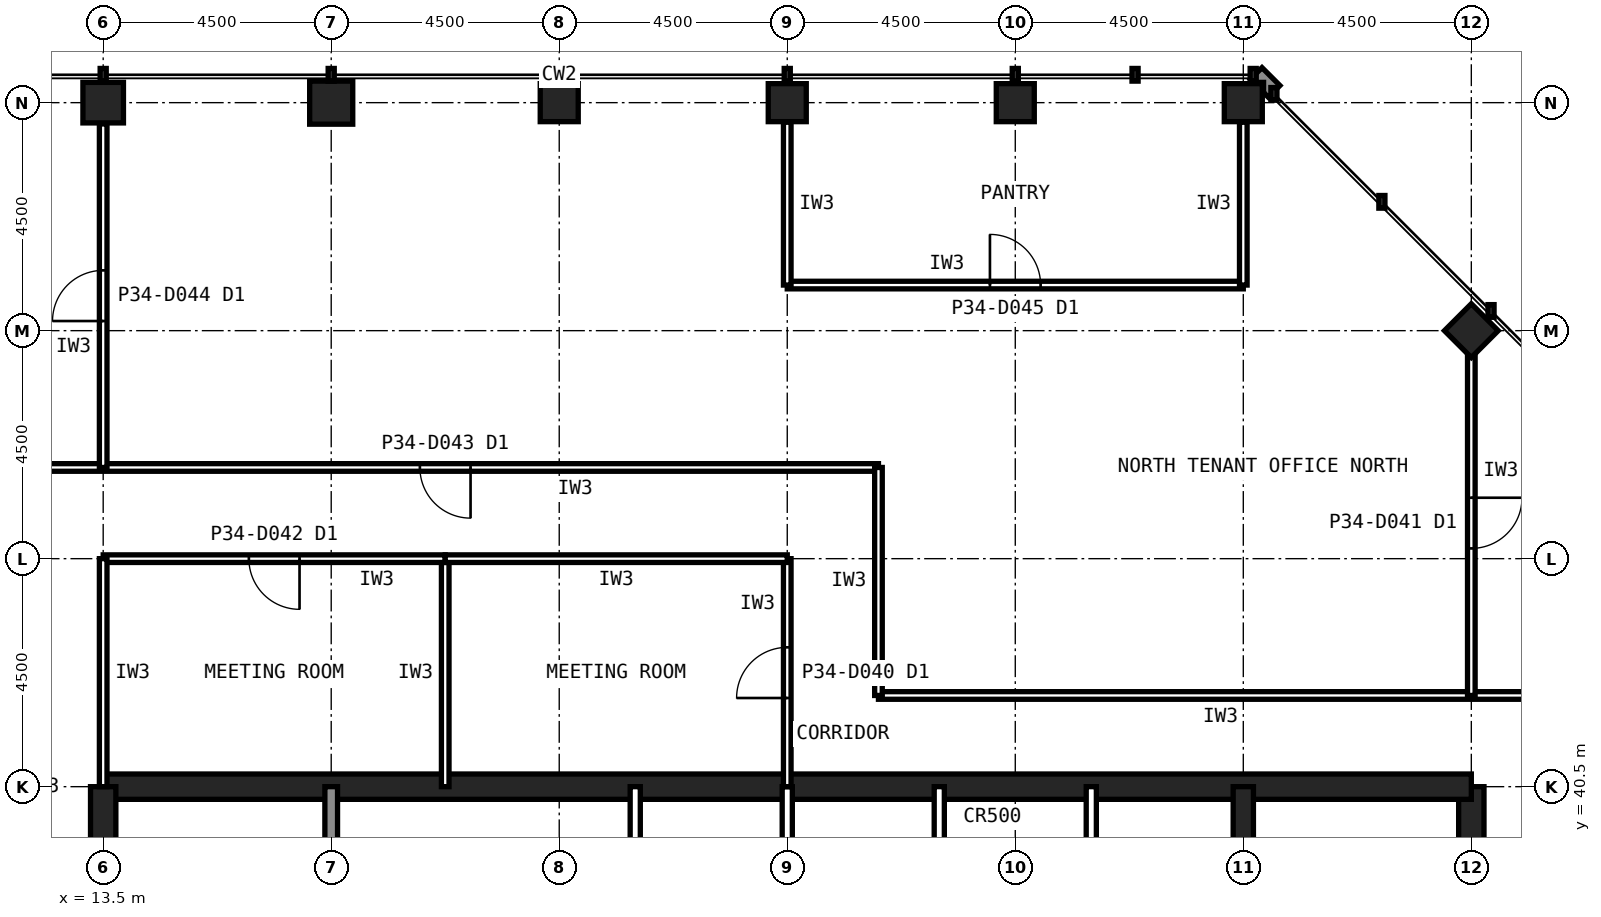
"""IFC4 building model, lengths in metres.
Left out: names, types, materials, properties, quantities, classifications, styles, units other than length and angle.
Written with IfcOpenShell. Run it as: python <this file> out.ifc"""

import sys

from ifc_helpers import new_model, si_unit, direction, frame, frame_2d, origin, origin_2d, place, context, subcontext, project, spatial, rectangle, hollow_rectangle, extrude, element, fill, save


model = new_model("IFC4")
c1 = context("Model", 3, precision=1e-05, world=origin(), true_north=direction((0.0, 1.0)))
c2 = subcontext(c1, "Body", "Model", "MODEL_VIEW")
j1 = project(units=[si_unit("LENGTHUNIT", "METRE"), si_unit("PLANEANGLEUNIT", "RADIAN")], contexts=[c1])
p1 = place(None, origin())
s1 = spatial("IfcSite", under=j1, at=p1, CompositionType="ELEMENT")
p2 = place(p1, origin())
s2 = spatial("IfcBuilding", under=s1, at=p2, CompositionType="ELEMENT")
p3 = place(p2, frame((0.0, 0.0, 143.6)))
s3 = spatial("IfcBuildingStorey", under=s2, at=p3, CompositionType="ELEMENT", Elevation=143.6)
for number, where, z_axis, x_axis in (
    (1, (36.0, 54.0, 0.0), (0.0, 0.0, 1.0), (1.0, 0.0, 0.0)),
    (2, (31.5, 54.0, 0.0), (0.0, 0.0, 1.0), (1.0, 0.0, 0.0)),
    (3, (27.0, 54.0, 0.0), (0.0, 0.0, 1.0), (1.0, 0.0, 0.0)),
    (4, (22.5, 54.0, 0.0), (0.0, 0.0, 1.0), (1.0, 0.0, 0.0)),
):
    element("IfcColumn", number, at=place(p3, frame(where, z_axis=z_axis, x_axis=x_axis)), inside=s3, PredefinedType="COLUMN", context=c2, shape_type="SweptSolid", body=[
        extrude(hollow_rectangle(XDim=0.75, YDim=0.75, WallThickness=0.04, at=origin_2d()), origin(), (0.0, 0.0, 1.0), 4.0),
    ])
p4 = place(p3, frame((18.0, 54.0, 0.0), z_axis=(0.0, 0.0, 1.0), x_axis=(1.0, 0.0, 0.0)))
e5 = element("IfcColumn", 5, at=p4, inside=s3, PredefinedType="COLUMN", context=c2, shape_type="SweptSolid", body=[
    extrude(hollow_rectangle(XDim=0.85, YDim=0.85, WallThickness=0.05, at=origin_2d()), origin(), (0.0, 0.0, 1.0), 4.0),
])
p5 = place(p3, frame((13.5, 54.0, 0.0), z_axis=(0.0, 0.0, 1.0), x_axis=(1.0, 0.0, 0.0)))
e6 = element("IfcColumn", 6, at=p5, inside=s3, PredefinedType="COLUMN", context=c2, shape_type="SweptSolid", body=[
    extrude(hollow_rectangle(XDim=0.8, YDim=0.8, WallThickness=0.045, at=origin_2d()), origin(), (0.0, 0.0, 1.0), 4.0),
])
p6 = place(p3, frame((40.5, 49.5, 0.0), z_axis=(0.0, 0.0, 1.0), x_axis=(0.707106781187, 0.707106781187, 0.0)))
e7 = element("IfcColumn", 7, at=p6, inside=s3, PredefinedType="COLUMN", context=c2, shape_type="SweptSolid", body=[
    extrude(hollow_rectangle(XDim=0.75, YDim=0.75, WallThickness=0.04, at=origin_2d()), origin(), (0.0, 0.0, 1.0), 4.0),
])
p7 = place(p3, frame((40.5, 13.5, 0.0), z_axis=(0.0, 0.0, 1.0), x_axis=(0.0, 1.0, 0.0)))
e8 = element("IfcWall", 8, at=p7, inside=s3, PredefinedType="SHEAR", context=c2, shape_type="SweptSolid", body=[
    extrude(rectangle(XDim=27.0, YDim=0.5, at=frame_2d((13.5, 0.0))), origin(), (0.0, 0.0, 1.0), 4.0),
])
p8 = place(p7, frame((5.85, 0.0, 0.0)))
e9 = element("IfcOpeningElement", 9, at=p8, cuts=e8, PredefinedType="OPENING", context=c2, shape_type="SweptSolid", body=[
    extrude(rectangle(XDim=1.8, YDim=2.1, at=frame_2d((0.9, 1.05))), frame((0.0, 0.26, 0.0), z_axis=(0.0, -1.0, 0.0), x_axis=(1.0, 0.0, 0.0)), (0.0, 0.0, 1.0), 0.52),
])
p9 = place(p7, frame((19.65, 0.0, 0.0)))
e10 = element("IfcOpeningElement", 10, at=p9, cuts=e8, PredefinedType="OPENING", context=c2, shape_type="SweptSolid", body=[
    extrude(rectangle(XDim=1.2, YDim=2.1, at=frame_2d((0.6, 1.05))), frame((0.0, 0.26, 0.0), z_axis=(0.0, -1.0, 0.0), x_axis=(1.0, 0.0, 0.0)), (0.0, 0.0, 1.0), 0.52),
])
p10 = place(p3, frame((40.5, 40.5, 0.0), z_axis=(0.0, 0.0, 1.0), x_axis=(-1.0, 0.0, 0.0)))
e11 = element("IfcWall", 11, at=p10, inside=s3, PredefinedType="SHEAR", context=c2, shape_type="SweptSolid", body=[
    extrude(rectangle(XDim=27.0, YDim=0.5, at=frame_2d((13.5, 0.0))), origin(), (0.0, 0.0, 1.0), 4.0),
])
p11 = place(p3, frame((13.5, 40.5, 0.0), z_axis=(0.0, 0.0, 1.0), x_axis=(0.0, -1.0, 0.0)))
e12 = element("IfcWall", 12, at=p11, inside=s3, PredefinedType="SHEAR", context=c2, shape_type="SweptSolid", body=[
    extrude(rectangle(XDim=27.0, YDim=0.5, at=frame_2d((13.5, 0.0))), origin(), (0.0, 0.0, 1.0), 4.0),
])
p12 = place(p11, frame((19.65, 0.0, 0.0)))
e13 = element("IfcOpeningElement", 13, at=p12, cuts=e12, PredefinedType="OPENING", context=c2, shape_type="SweptSolid", body=[
    extrude(rectangle(XDim=1.2, YDim=2.1, at=frame_2d((0.6, 1.05))), frame((0.0, 0.26, 0.0), z_axis=(0.0, -1.0, 0.0), x_axis=(1.0, 0.0, 0.0)), (0.0, 0.0, 1.0), 0.52),
])
p13 = place(p11, frame((5.85, 0.0, 0.0)))
e14 = element("IfcOpeningElement", 14, at=p13, cuts=e12, PredefinedType="OPENING", context=c2, shape_type="SweptSolid", body=[
    extrude(rectangle(XDim=1.8, YDim=2.1, at=frame_2d((0.9, 1.05))), frame((0.0, 0.26, 0.0), z_axis=(0.0, -1.0, 0.0), x_axis=(1.0, 0.0, 0.0)), (0.0, 0.0, 1.0), 0.52),
])
p14 = place(p3, frame((18.0, 36.0, 0.0), z_axis=(0.0, 0.0, 1.0), x_axis=(0.0, 1.0, 0.0)))
e15 = element("IfcWall", 15, at=p14, inside=s3, PredefinedType="SOLIDWALL", context=c2, shape_type="SweptSolid", body=[
    extrude(rectangle(XDim=4.5, YDim=0.25, at=frame_2d((2.25, 0.0))), origin(), (0.0, 0.0, 1.0), 3.84),
])
p15 = place(p3, frame((36.0, 22.5, 0.0), z_axis=(0.0, 0.0, 1.0), x_axis=(0.0, 1.0, 0.0)))
e16 = element("IfcWall", 16, at=p15, inside=s3, PredefinedType="SHEAR", context=c2, shape_type="SweptSolid", body=[
    extrude(rectangle(XDim=18.0, YDim=0.4, at=frame_2d((9.0, 0.0))), origin(), (0.0, 0.0, 1.0), 4.0),
])
for number, where, z_axis, x_axis in (
    (17, (21.0, 36.0, 0.0), (0.0, 0.0, 1.0), (0.0, 1.0, 0.0)),
    (18, (24.0, 36.0, 0.0), (0.0, 0.0, 1.0), (0.0, 1.0, 0.0)),
    (19, (27.0, 36.0, 0.0), (0.0, 0.0, 1.0), (0.0, 1.0, 0.0)),
    (20, (30.0, 36.0, 0.0), (0.0, 0.0, 1.0), (0.0, 1.0, 0.0)),
    (21, (33.0, 36.0, 0.0), (0.0, 0.0, 1.0), (0.0, 1.0, 0.0)),
):
    element("IfcWall", number, at=place(p3, frame(where, z_axis=z_axis, x_axis=x_axis)), inside=s3, PredefinedType="PARTITIONING", context=c2, shape_type="SweptSolid", body=[
        extrude(rectangle(XDim=4.5, YDim=0.2, at=frame_2d((2.25, 0.0))), origin(), (0.0, 0.0, 1.0), 3.84),
    ])
p16 = place(p3, frame((28.8, 46.8, 0.0), z_axis=(0.0, 0.0, 1.0), x_axis=(-1.0, 0.0, 0.0)))
e22 = element("IfcWall", 22, at=p16, inside=s3, PredefinedType="PARTITIONING", context=c2, shape_type="SweptSolid", body=[
    extrude(rectangle(XDim=17.1, YDim=0.15, at=frame_2d((8.55, 0.0))), origin(), (0.0, 0.0, 1.0), 3.84),
])
p17 = place(p16, frame((8.05, 0.0, 0.0)))
e23 = element("IfcOpeningElement", 23, at=p17, cuts=e22, PredefinedType="OPENING", context=c2, shape_type="SweptSolid", body=[
    extrude(rectangle(XDim=1.0, YDim=2.1, at=frame_2d((0.5, 1.05))), frame((0.0, 0.085, 0.0), z_axis=(0.0, -1.0, 0.0), x_axis=(1.0, 0.0, 0.0)), (0.0, 0.0, 1.0), 0.17),
])
p18 = place(p3, frame((42.3, 42.3, 0.0), z_axis=(0.0, 0.0, 1.0), x_axis=(-1.0, 0.0, 0.0)))
e24 = element("IfcWall", 24, at=p18, inside=s3, PredefinedType="PARTITIONING", context=c2, shape_type="SweptSolid", body=[
    extrude(rectangle(XDim=13.5, YDim=0.15, at=frame_2d((6.75, 0.0))), origin(), (0.0, 0.0, 1.0), 3.84),
])
for number, where, z_axis, x_axis in (
    (25, (28.8, 42.3, 0.0), (0.0, 0.0, 1.0), (0.0, 1.0, 0.0)),
    (26, (20.25, 40.5, 0.0), (0.0, 0.0, 1.0), (0.0, 1.0, 0.0)),
):
    element("IfcWall", number, at=place(p3, frame(where, z_axis=z_axis, x_axis=x_axis)), inside=s3, PredefinedType="PARTITIONING", context=c2, shape_type="SweptSolid", body=[
        extrude(rectangle(XDim=4.5, YDim=0.15, at=frame_2d((2.25, 0.0))), origin(), (0.0, 0.0, 1.0), 3.84),
    ])
p19 = place(p3, frame((20.25, 45.0, 0.0), z_axis=(0.0, 0.0, 1.0), x_axis=(-1.0, 0.0, 0.0)))
e27 = element("IfcWall", 27, at=p19, inside=s3, PredefinedType="PARTITIONING", context=c2, shape_type="SweptSolid", body=[
    extrude(rectangle(XDim=6.75, YDim=0.15, at=frame_2d((3.375, 0.0))), origin(), (0.0, 0.0, 1.0), 3.84),
])
p20 = place(p19, frame((2.875, 0.0, 0.0)))
e28 = element("IfcOpeningElement", 28, at=p20, cuts=e27, PredefinedType="OPENING", context=c2, shape_type="SweptSolid", body=[
    extrude(rectangle(XDim=1.0, YDim=2.1, at=frame_2d((0.5, 1.05))), frame((0.0, 0.085, 0.0), z_axis=(0.0, -1.0, 0.0), x_axis=(1.0, 0.0, 0.0)), (0.0, 0.0, 1.0), 0.17),
])
p21 = place(p3, frame((13.5, 45.0, 0.0), z_axis=(0.0, 0.0, 1.0), x_axis=(0.0, -1.0, 0.0)))
e29 = element("IfcWall", 29, at=p21, inside=s3, PredefinedType="PARTITIONING", context=c2, shape_type="SweptSolid", body=[
    extrude(rectangle(XDim=4.5, YDim=0.15, at=frame_2d((2.25, 0.0))), origin(), (0.0, 0.0, 1.0), 2.989),
])
p22 = place(p3, frame((27.0, 40.5, 0.0), z_axis=(0.0, 0.0, 1.0), x_axis=(0.0, 1.0, 0.0)))
e30 = element("IfcWall", 30, at=p22, inside=s3, PredefinedType="PARTITIONING", context=c2, shape_type="SweptSolid", body=[
    extrude(rectangle(XDim=4.5, YDim=0.15, at=frame_2d((2.25, 0.0))), origin(), (0.0, 0.0, 1.0), 2.989),
])
p23 = place(p22, frame((1.75, 0.0, 0.0)))
e31 = element("IfcOpeningElement", 31, at=p23, cuts=e30, PredefinedType="OPENING", context=c2, shape_type="SweptSolid", body=[
    extrude(rectangle(XDim=1.0, YDim=2.1, at=frame_2d((0.5, 1.05))), frame((0.0, 0.085, 0.0), z_axis=(0.0, -1.0, 0.0), x_axis=(1.0, 0.0, 0.0)), (0.0, 0.0, 1.0), 0.17),
])
p24 = place(p3, frame((27.0, 45.0, 0.0), z_axis=(0.0, 0.0, 1.0), x_axis=(-1.0, 0.0, 0.0)))
e32 = element("IfcWall", 32, at=p24, inside=s3, PredefinedType="PARTITIONING", context=c2, shape_type="SweptSolid", body=[
    extrude(rectangle(XDim=6.75, YDim=0.15, at=frame_2d((3.375, 0.0))), origin(), (0.0, 0.0, 1.0), 3.84),
])
p25 = place(p3, frame((27.0, 50.4, 0.0), z_axis=(0.0, 0.0, 1.0), x_axis=(1.0, 0.0, 0.0)))
e33 = element("IfcWall", 33, at=p25, inside=s3, PredefinedType="PARTITIONING", context=c2, shape_type="SweptSolid", body=[
    extrude(rectangle(XDim=9.0, YDim=0.15, at=frame_2d((4.5, 0.0))), origin(), (0.0, 0.0, 1.0), 3.84),
])
p26 = place(p25, frame((4.0, 0.0, 0.0)))
e34 = element("IfcOpeningElement", 34, at=p26, cuts=e33, PredefinedType="OPENING", context=c2, shape_type="SweptSolid", body=[
    extrude(rectangle(XDim=1.0, YDim=2.1, at=frame_2d((0.5, 1.05))), frame((0.0, 0.085, 0.0), z_axis=(0.0, -1.0, 0.0), x_axis=(1.0, 0.0, 0.0)), (0.0, 0.0, 1.0), 0.17),
])
for number, where, z_axis, x_axis in (
    (35, (36.0, 50.4, 0.0), (0.0, 0.0, 1.0), (0.0, 1.0, 0.0)),
    (36, (27.0, 53.615, 0.0), (0.0, 0.0, 1.0), (0.0, -1.0, 0.0)),
):
    element("IfcWall", number, at=place(p3, frame(where, z_axis=z_axis, x_axis=x_axis)), inside=s3, PredefinedType="PARTITIONING", context=c2, shape_type="SweptSolid", body=[
        extrude(rectangle(XDim=3.215, YDim=0.15, at=frame_2d((1.607, 0.0))), origin(), (0.0, 0.0, 1.0), 2.989),
    ])
p27 = place(p3, frame((40.5, 49.105, 0.0), z_axis=(0.0, 0.0, 1.0), x_axis=(0.0, -1.0, 0.0)))
e37 = element("IfcWall", 37, at=p27, inside=s3, PredefinedType="PARTITIONING", context=c2, shape_type="SweptSolid", body=[
    extrude(rectangle(XDim=6.805, YDim=0.15, at=frame_2d((3.402, 0.0))), origin(), (0.0, 0.0, 1.0), 2.989),
])
p28 = place(p27, frame((2.903, 0.0, 0.0)))
e38 = element("IfcOpeningElement", 38, at=p28, cuts=e37, PredefinedType="OPENING", context=c2, shape_type="SweptSolid", body=[
    extrude(rectangle(XDim=1.0, YDim=2.1, at=frame_2d((0.5, 1.05))), frame((0.0, 0.085, 0.0), z_axis=(0.0, -1.0, 0.0), x_axis=(1.0, 0.0, 0.0)), (0.0, 0.0, 1.0), 0.17),
])
p29 = place(p3, frame((13.5, 46.8, 0.0), z_axis=(0.0, 0.0, 1.0), x_axis=(0.0, 1.0, 0.0)))
e39 = element("IfcWall", 39, at=p29, inside=s3, PredefinedType="PARTITIONING", context=c2, shape_type="SweptSolid", body=[
    extrude(rectangle(XDim=6.78, YDim=0.15, at=frame_2d((3.39, 0.0))), origin(), (0.0, 0.0, 1.0), 2.989),
])
p30 = place(p29, frame((2.89, 0.0, 0.0)))
e40 = element("IfcOpeningElement", 40, at=p30, cuts=e39, PredefinedType="OPENING", context=c2, shape_type="SweptSolid", body=[
    extrude(rectangle(XDim=1.0, YDim=2.1, at=frame_2d((0.5, 1.05))), frame((0.0, 0.085, 0.0), z_axis=(0.0, -1.0, 0.0), x_axis=(1.0, 0.0, 0.0)), (0.0, 0.0, 1.0), 0.17),
])
p31 = place(p17, origin())
e41 = element("IfcDoor", 41, at=p31, inside=s3, OperationType="SINGLE_SWING_LEFT", PredefinedType="DOOR", context=c2, shape_type="SweptSolid", body=[
    extrude(rectangle(XDim=1.0, YDim=2.1, at=frame_2d((0.5, 1.05))), frame((0.0, 0.025, 0.0), z_axis=(0.0, -1.0, 0.0), x_axis=(1.0, 0.0, 0.0)), (0.0, 0.0, 1.0), 0.05),
])
fill(e23, e41)
p32 = place(p20, origin())
e42 = element("IfcDoor", 42, at=p32, inside=s3, OperationType="SINGLE_SWING_LEFT", PredefinedType="DOOR", context=c2, shape_type="SweptSolid", body=[
    extrude(rectangle(XDim=1.0, YDim=2.1, at=frame_2d((0.5, 1.05))), frame((0.0, 0.025, 0.0), z_axis=(0.0, -1.0, 0.0), x_axis=(1.0, 0.0, 0.0)), (0.0, 0.0, 1.0), 0.05),
])
fill(e28, e42)
p33 = place(p23, origin())
e43 = element("IfcDoor", 43, at=p33, inside=s3, OperationType="SINGLE_SWING_LEFT", PredefinedType="DOOR", context=c2, shape_type="SweptSolid", body=[
    extrude(rectangle(XDim=1.0, YDim=2.1, at=frame_2d((0.5, 1.05))), frame((0.0, 0.025, 0.0), z_axis=(0.0, -1.0, 0.0), x_axis=(1.0, 0.0, 0.0)), (0.0, 0.0, 1.0), 0.05),
])
fill(e31, e43)
p34 = place(p26, origin())
e44 = element("IfcDoor", 44, at=p34, inside=s3, OperationType="SINGLE_SWING_LEFT", PredefinedType="DOOR", context=c2, shape_type="SweptSolid", body=[
    extrude(rectangle(XDim=1.0, YDim=2.1, at=frame_2d((0.5, 1.05))), frame((0.0, 0.025, 0.0), z_axis=(0.0, -1.0, 0.0), x_axis=(1.0, 0.0, 0.0)), (0.0, 0.0, 1.0), 0.05),
])
fill(e34, e44)
p35 = place(p28, origin())
e45 = element("IfcDoor", 45, at=p35, inside=s3, OperationType="SINGLE_SWING_LEFT", PredefinedType="DOOR", context=c2, shape_type="SweptSolid", body=[
    extrude(rectangle(XDim=1.0, YDim=2.1, at=frame_2d((0.5, 1.05))), frame((0.0, 0.025, 0.0), z_axis=(0.0, -1.0, 0.0), x_axis=(1.0, 0.0, 0.0)), (0.0, 0.0, 1.0), 0.05),
])
fill(e38, e45)
p36 = place(p30, origin())
e46 = element("IfcDoor", 46, at=p36, inside=s3, OperationType="SINGLE_SWING_LEFT", PredefinedType="DOOR", context=c2, shape_type="SweptSolid", body=[
    extrude(rectangle(XDim=1.0, YDim=2.1, at=frame_2d((0.5, 1.05))), frame((0.0, 0.025, 0.0), z_axis=(0.0, -1.0, 0.0), x_axis=(1.0, 0.0, 0.0)), (0.0, 0.0, 1.0), 0.05),
])
fill(e40, e46)
save(model, sys.argv[1])
